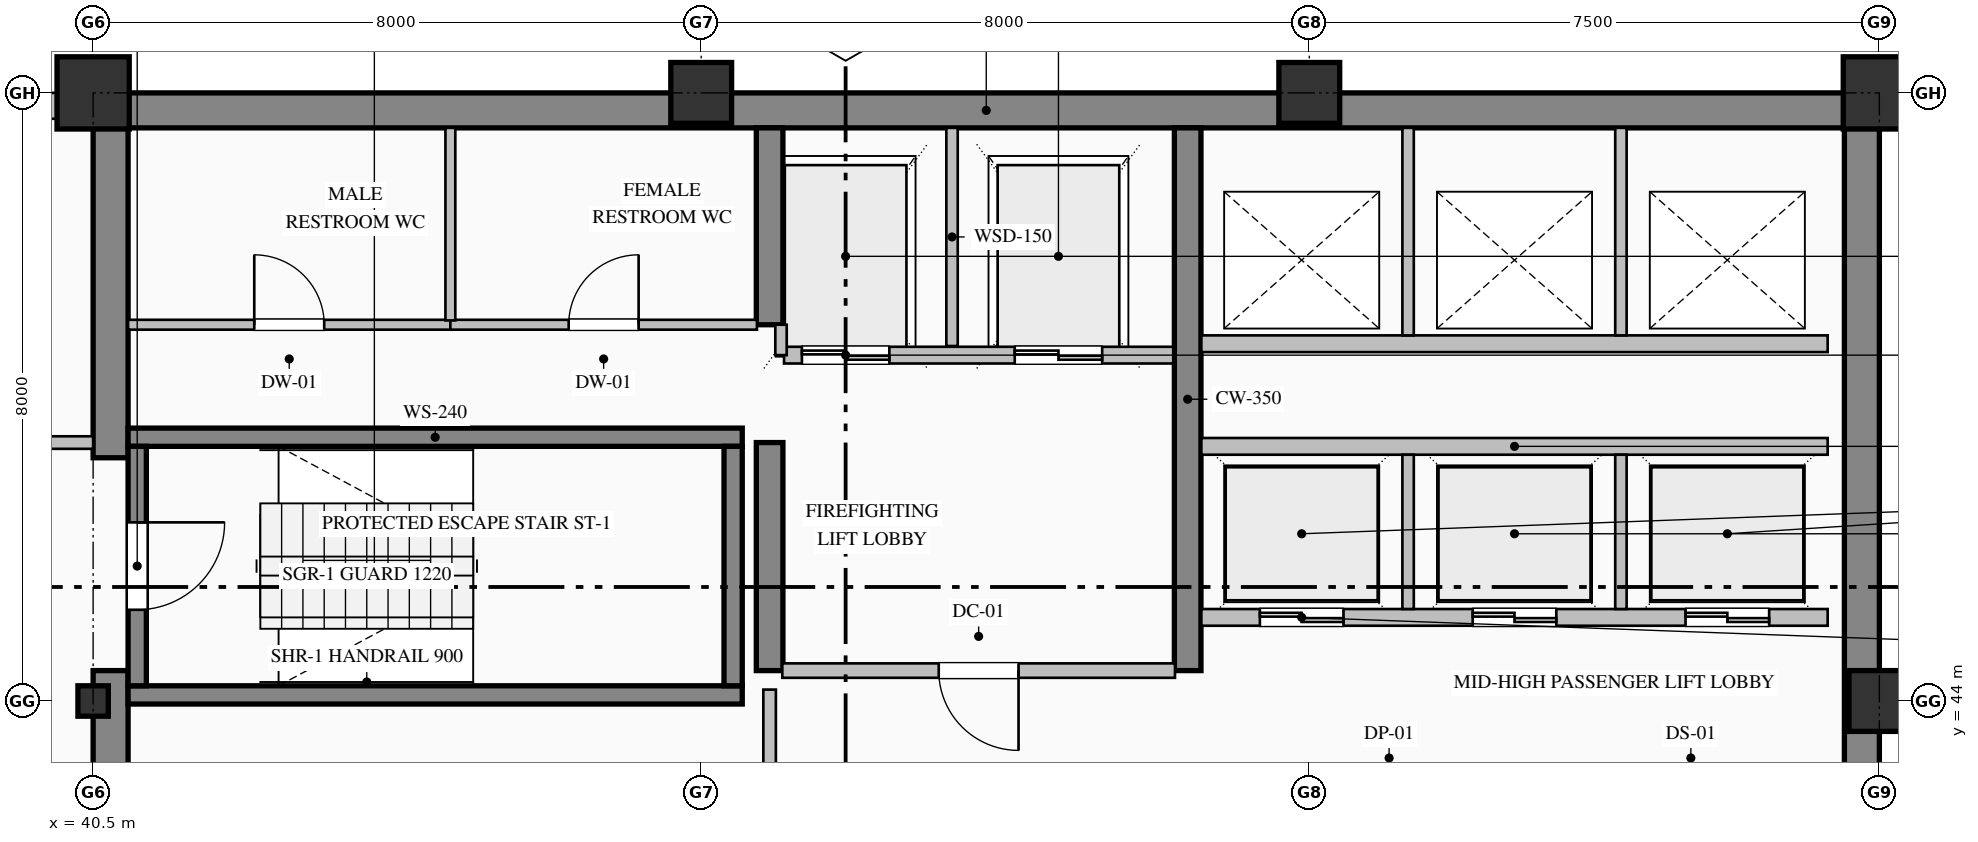
"""IFC4 building model, lengths in metres.
Left out: names, types, materials, properties, quantities, classifications, styles, units other than length and angle.
Written with IfcOpenShell. Run it as: python <this file> out.ifc"""

import sys

from ifc_helpers import new_model, si_unit, direction, frame, frame_2d, origin, origin_2d, place, context, subcontext, project, spatial, rectangle, hollow_rectangle, i_section, extrude, element, fill, save


model = new_model("IFC4")
c1 = context("Model", 3, precision=1e-05, world=origin(), true_north=direction((0.0, 1.0)))
c2 = subcontext(c1, "Body", "Model", "MODEL_VIEW")
j1 = project(units=[si_unit("LENGTHUNIT", "METRE"), si_unit("PLANEANGLEUNIT", "RADIAN")], contexts=[c1])
p1 = place(None, origin())
s1 = spatial("IfcSite", under=j1, at=p1, CompositionType="ELEMENT")
p2 = place(p1, origin())
s2 = spatial("IfcBuilding", under=s1, at=p2, CompositionType="ELEMENT")
p3 = place(p2, frame((0.0, 0.0, 265.8)))
s3 = spatial("IfcBuildingStorey", under=s2, at=p3, CompositionType="ELEMENT", Elevation=265.8)
p4 = place(p3, frame((40.5, 51.77, 0.0), z_axis=(0.0, 0.0, 1.0), x_axis=(1.0, 0.0, 0.0)))
e1 = element("IfcWall", 1, at=p4, inside=s3, PredefinedType="SHEAR", context=c2, shape_type="SweptSolid", body=[
    extrude(rectangle(XDim=23.5, YDim=0.46, at=frame_2d((11.75, 0.0))), origin(), (0.0, 0.0, 1.0), 3.775),
])
p5 = place(p3, frame((63.77, 36.32, 0.0), z_axis=(0.0, 0.0, 1.0), x_axis=(0.0, 1.0, 0.0)))
e2 = element("IfcWall", 2, at=p5, inside=s3, PredefinedType="SHEAR", context=c2, shape_type="SweptSolid", body=[
    extrude(rectangle(XDim=15.22, YDim=0.46, at=frame_2d((7.61, 0.0))), origin(), (0.0, 0.0, 1.0), 3.775),
])
p6 = place(p3, frame((40.73, 36.46, 0.0), z_axis=(0.0, 0.0, 1.0), x_axis=(0.0, 1.0, 0.0)))
e3 = element("IfcWall", 3, at=p6, inside=s3, PredefinedType="SHEAR", context=c2, shape_type="SweptSolid", body=[
    extrude(rectangle(XDim=7.94, YDim=0.46, at=frame_2d((3.97, 0.0))), origin(), (0.0, 0.0, 1.0), 3.775),
])
p7 = place(p3, frame((40.73, 47.2, 0.0), z_axis=(0.0, 0.0, 1.0), x_axis=(0.0, 1.0, 0.0)))
e4 = element("IfcWall", 4, at=p7, inside=s3, PredefinedType="SHEAR", context=c2, shape_type="SweptSolid", body=[
    extrude(rectangle(XDim=4.34, YDim=0.46, at=frame_2d((2.17, 0.0))), origin(), (0.0, 0.0, 1.0), 3.775),
])
p8 = place(p3, frame((49.4, 44.4, 0.0), z_axis=(0.0, 0.0, 1.0), x_axis=(0.0, 1.0, 0.0)))
e5 = element("IfcWall", 5, at=p8, inside=s3, PredefinedType="SHEAR", context=c2, shape_type="SweptSolid", body=[
    extrude(rectangle(XDim=3.0, YDim=0.35, at=frame_2d((1.5, 0.0))), origin(), (0.0, 0.0, 1.0), 3.775),
])
p9 = place(p3, frame((49.4, 48.95, 0.0), z_axis=(0.0, 0.0, 1.0), x_axis=(0.0, 1.0, 0.0)))
e6 = element("IfcWall", 6, at=p9, inside=s3, PredefinedType="SHEAR", context=c2, shape_type="SweptSolid", body=[
    extrude(rectangle(XDim=2.59, YDim=0.35, at=frame_2d((1.295, 0.0))), origin(), (0.0, 0.0, 1.0), 3.775),
])
p10 = place(p3, frame((54.9, 44.4, 0.0), z_axis=(0.0, 0.0, 1.0), x_axis=(0.0, 1.0, 0.0)))
e7 = element("IfcWall", 7, at=p10, inside=s3, PredefinedType="SHEAR", context=c2, shape_type="SweptSolid", body=[
    extrude(rectangle(XDim=7.14, YDim=0.35, at=frame_2d((3.57, 0.0))), origin(), (0.0, 0.0, 1.0), 3.775),
])
p11 = place(p3, frame((40.5, 44.0, 0.0), z_axis=(0.0, 0.0, 1.0), x_axis=(1.0, 0.0, 0.0)))
e8 = element("IfcColumn", 8, at=p11, inside=s3, PredefinedType="COLUMN", context=c2, shape_type="SweptSolid", body=[
    extrude(i_section(OverallWidth=0.4, OverallDepth=0.4, WebThickness=0.013, FlangeThickness=0.021, FilletRadius=0.022, at=origin_2d()), origin(), (0.0, 0.0, 1.0), 4.0),
])
p12 = place(p3, frame((40.5, 52.0, 0.0), z_axis=(0.0, 0.0, 1.0), x_axis=(1.0, 0.0, 0.0)))
e9 = element("IfcColumn", 9, at=p12, inside=s3, PredefinedType="COLUMN", context=c2, shape_type="SweptSolid", body=[
    extrude(hollow_rectangle(XDim=0.95, YDim=0.95, WallThickness=0.036, at=origin_2d()), origin(), (0.0, 0.0, 1.0), 4.0),
])
for number, where, z_axis, x_axis in (
    (10, (48.5, 52.0, 0.0), (0.0, 0.0, 1.0), (1.0, 0.0, 0.0)),
    (11, (56.5, 52.0, 0.0), (0.0, 0.0, 1.0), (1.0, 0.0, 0.0)),
    (12, (64.0, 44.0, 0.0), (0.0, 0.0, 1.0), (1.0, 0.0, 0.0)),
):
    element("IfcColumn", number, at=place(p3, frame(where, z_axis=z_axis, x_axis=x_axis)), inside=s3, PredefinedType="COLUMN", context=c2, shape_type="SweptSolid", body=[
        extrude(hollow_rectangle(XDim=0.8, YDim=0.8, WallThickness=0.032, at=origin_2d()), origin(), (0.0, 0.0, 1.0), 4.0),
    ])
p13 = place(p3, frame((64.0, 52.0, 0.0), z_axis=(0.0, 0.0, 1.0), x_axis=(1.0, 0.0, 0.0)))
e13 = element("IfcColumn", 13, at=p13, inside=s3, PredefinedType="COLUMN", context=c2, shape_type="SweptSolid", body=[
    extrude(hollow_rectangle(XDim=0.95, YDim=0.95, WallThickness=0.036, at=origin_2d()), origin(), (0.0, 0.0, 1.0), 4.0),
])
p14 = place(p3, frame((13.0, 51.83, 0.0), z_axis=(0.0, 0.0, 1.0), x_axis=(1.0, 0.0, 0.0)))
e14 = element("IfcWall", 14, at=p14, inside=s3, PredefinedType="SOLIDWALL", context=c2, shape_type="SweptSolid", body=[
    extrude(rectangle(XDim=27.52, YDim=0.34, at=frame_2d((13.76, 0.0))), origin(), (0.0, 0.0, 1.0), 3.325),
])
p15 = place(p14, frame((6.525, 0.0, 0.9)))
e15 = element("IfcOpeningElement", 15, at=p15, cuts=e14, PredefinedType="OPENING", context=c2, shape_type="SweptSolid", body=[
    extrude(rectangle(XDim=1.35, YDim=1.85, at=frame_2d((0.675, 0.925))), frame((0.0, 0.18, 0.0), z_axis=(0.0, -1.0, 0.0), x_axis=(1.0, 0.0, 0.0)), (0.0, 0.0, 1.0), 0.36),
])
p16 = place(p14, frame((17.325, 0.0, 0.9)))
e16 = element("IfcOpeningElement", 16, at=p16, cuts=e14, PredefinedType="OPENING", context=c2, shape_type="SweptSolid", body=[
    extrude(rectangle(XDim=1.35, YDim=1.85, at=frame_2d((0.675, 0.925))), frame((0.0, 0.18, 0.0), z_axis=(0.0, -1.0, 0.0), x_axis=(1.0, 0.0, 0.0)), (0.0, 0.0, 1.0), 0.36),
])
for number, where, z_axis, x_axis in (
    (17, (40.96, 47.47, 0.0), (0.0, 0.0, 1.0), (1.0, 0.0, 0.0)),
    (18, (49.04, 44.08, 0.0), (0.0, 0.0, 1.0), (-1.0, 0.0, 0.0)),
):
    element("IfcWall", number, at=place(p3, frame(where, z_axis=z_axis, x_axis=x_axis)), inside=s3, PredefinedType="SOLIDWALL", context=c2, shape_type="SweptSolid", body=[
        extrude(rectangle(XDim=8.08, YDim=0.24, at=frame_2d((4.04, 0.0))), origin(), (0.0, 0.0, 1.0), 4.0),
    ])
p17 = place(p3, frame((41.08, 47.35, 0.0), z_axis=(0.0, 0.0, 1.0), x_axis=(0.0, -1.0, 0.0)))
e19 = element("IfcWall", 19, at=p17, inside=s3, PredefinedType="SOLIDWALL", context=c2, shape_type="SweptSolid", body=[
    extrude(rectangle(XDim=3.15, YDim=0.24, at=frame_2d((1.575, 0.0))), origin(), (0.0, 0.0, 1.0), 4.0),
])
p18 = place(p17, frame((1.0, 0.0, 0.0)))
e20 = element("IfcOpeningElement", 20, at=p18, cuts=e19, PredefinedType="OPENING", context=c2, shape_type="SweptSolid", body=[
    extrude(rectangle(XDim=1.15, YDim=2.2, at=frame_2d((0.575, 1.1))), frame((0.0, 0.13, 0.0), z_axis=(0.0, -1.0, 0.0), x_axis=(1.0, 0.0, 0.0)), (0.0, 0.0, 1.0), 0.26),
])
p19 = place(p3, frame((48.92, 44.2, 0.0), z_axis=(0.0, 0.0, 1.0), x_axis=(0.0, 1.0, 0.0)))
e21 = element("IfcWall", 21, at=p19, inside=s3, PredefinedType="SOLIDWALL", context=c2, shape_type="SweptSolid", body=[
    extrude(rectangle(XDim=3.15, YDim=0.24, at=frame_2d((1.575, 0.0))), origin(), (0.0, 0.0, 1.0), 4.0),
])
p20 = place(p3, frame((54.71, 48.55, 0.0), z_axis=(0.0, 0.0, 1.0), x_axis=(-1.0, 0.0, 0.0)))
e22 = element("IfcWall", 22, at=p20, inside=s3, PredefinedType="PARTITIONING", context=c2, shape_type="SweptSolid", body=[
    extrude(rectangle(XDim=5.12, YDim=0.22, at=frame_2d((2.56, 0.0))), origin(), (0.0, 0.0, 1.0), 3.775),
])
p21 = place(p20, frame((3.735, 0.0, 0.0)))
e23 = element("IfcOpeningElement", 23, at=p21, cuts=e22, PredefinedType="OPENING", context=c2, shape_type="SweptSolid", body=[
    extrude(rectangle(XDim=1.15, YDim=2.2, at=frame_2d((0.575, 1.1))), frame((0.0, 0.12, 0.0), z_axis=(0.0, -1.0, 0.0), x_axis=(1.0, 0.0, 0.0)), (0.0, 0.0, 1.0), 0.24),
])
p22 = place(p20, frame((0.935, 0.0, 0.0)))
e24 = element("IfcOpeningElement", 24, at=p22, cuts=e22, PredefinedType="OPENING", context=c2, shape_type="SweptSolid", body=[
    extrude(rectangle(XDim=1.15, YDim=2.2, at=frame_2d((0.575, 1.1))), frame((0.0, 0.12, 0.0), z_axis=(0.0, -1.0, 0.0), x_axis=(1.0, 0.0, 0.0)), (0.0, 0.0, 1.0), 0.24),
])
p23 = place(p3, frame((51.8, 48.67, 0.0), z_axis=(0.0, 0.0, 1.0), x_axis=(0.0, 1.0, 0.0)))
e25 = element("IfcWall", 25, at=p23, inside=s3, PredefinedType="PARTITIONING", context=c2, shape_type="SweptSolid", body=[
    extrude(rectangle(XDim=2.87, YDim=0.15, at=frame_2d((1.435, 0.0))), origin(), (0.0, 0.0, 1.0), 3.775),
])
p24 = place(p3, frame((49.55, 48.55, 0.0), z_axis=(0.0, 0.0, 1.0), x_axis=(0.0, 1.0, 0.0)))
e26 = element("IfcWall", 26, at=p24, inside=s3, PredefinedType="PARTITIONING", context=c2, shape_type="SweptSolid", body=[
    extrude(rectangle(XDim=0.4, YDim=0.15, at=frame_2d((0.2, 0.0))), origin(), (0.0, 0.0, 1.0), 3.775),
])
p25 = place(p3, frame((63.32, 45.1, 0.0), z_axis=(0.0, 0.0, 1.0), x_axis=(-1.0, 0.0, 0.0)))
e27 = element("IfcWall", 27, at=p25, inside=s3, PredefinedType="PARTITIONING", context=c2, shape_type="SweptSolid", body=[
    extrude(rectangle(XDim=8.24, YDim=0.22, at=frame_2d((4.12, 0.0))), origin(), (0.0, 0.0, 1.0), 3.775),
])
p26 = place(p25, frame((6.37, 0.0, 0.0)))
e28 = element("IfcOpeningElement", 28, at=p26, cuts=e27, PredefinedType="OPENING", context=c2, shape_type="SweptSolid", body=[
    extrude(rectangle(XDim=1.1, YDim=2.2, at=frame_2d((0.55, 1.1))), frame((0.0, 0.12, 0.0), z_axis=(0.0, -1.0, 0.0), x_axis=(1.0, 0.0, 0.0)), (0.0, 0.0, 1.0), 0.24),
])
p27 = place(p25, frame((3.57, 0.0, 0.0)))
e29 = element("IfcOpeningElement", 29, at=p27, cuts=e27, PredefinedType="OPENING", context=c2, shape_type="SweptSolid", body=[
    extrude(rectangle(XDim=1.1, YDim=2.2, at=frame_2d((0.55, 1.1))), frame((0.0, 0.12, 0.0), z_axis=(0.0, -1.0, 0.0), x_axis=(1.0, 0.0, 0.0)), (0.0, 0.0, 1.0), 0.24),
])
p28 = place(p25, frame((0.77, 0.0, 0.0)))
e30 = element("IfcOpeningElement", 30, at=p28, cuts=e27, PredefinedType="OPENING", context=c2, shape_type="SweptSolid", body=[
    extrude(rectangle(XDim=1.1, YDim=2.2, at=frame_2d((0.55, 1.1))), frame((0.0, 0.12, 0.0), z_axis=(0.0, -1.0, 0.0), x_axis=(1.0, 0.0, 0.0)), (0.0, 0.0, 1.0), 0.24),
])
p29 = place(p3, frame((55.08, 47.35, 0.0), z_axis=(0.0, 0.0, 1.0), x_axis=(1.0, 0.0, 0.0)))
e31 = element("IfcWall", 31, at=p29, inside=s3, PredefinedType="PARTITIONING", context=c2, shape_type="SweptSolid", body=[
    extrude(rectangle(XDim=8.24, YDim=0.22, at=frame_2d((4.12, 0.0))), origin(), (0.0, 0.0, 1.0), 3.775),
])
for number, where, z_axis, x_axis in (
    (32, (57.8, 45.21, 0.0), (0.0, 0.0, 1.0), (0.0, 1.0, 0.0)),
    (33, (60.6, 45.21, 0.0), (0.0, 0.0, 1.0), (0.0, 1.0, 0.0)),
):
    element("IfcWall", number, at=place(p3, frame(where, z_axis=z_axis, x_axis=x_axis)), inside=s3, PredefinedType="PARTITIONING", context=c2, shape_type="SweptSolid", body=[
        extrude(rectangle(XDim=2.03, YDim=0.15, at=frame_2d((1.015, 0.0))), origin(), (0.0, 0.0, 1.0), 3.775),
    ])
p30 = place(p3, frame((63.32, 48.7, 0.0), z_axis=(0.0, 0.0, 1.0), x_axis=(-1.0, 0.0, 0.0)))
e34 = element("IfcWall", 34, at=p30, inside=s3, PredefinedType="PARTITIONING", context=c2, shape_type="SweptSolid", body=[
    extrude(rectangle(XDim=8.24, YDim=0.22, at=frame_2d((4.12, 0.0))), origin(), (0.0, 0.0, 1.0), 3.775),
])
for number, where, z_axis, x_axis in (
    (35, (57.8, 48.81, 0.0), (0.0, 0.0, 1.0), (0.0, 1.0, 0.0)),
    (36, (60.6, 48.81, 0.0), (0.0, 0.0, 1.0), (0.0, 1.0, 0.0)),
):
    element("IfcWall", number, at=place(p3, frame(where, z_axis=z_axis, x_axis=x_axis)), inside=s3, PredefinedType="PARTITIONING", context=c2, shape_type="SweptSolid", body=[
        extrude(rectangle(XDim=2.73, YDim=0.15, at=frame_2d((1.365, 0.0))), origin(), (0.0, 0.0, 1.0), 3.775),
    ])
p31 = place(p3, frame((37.8, 47.4, 0.0), z_axis=(0.0, 0.0, 1.0), x_axis=(1.0, 0.0, 0.0)))
e37 = element("IfcWall", 37, at=p31, inside=s3, PredefinedType="PARTITIONING", context=c2, shape_type="SweptSolid", body=[
    extrude(rectangle(XDim=2.7, YDim=0.165, at=frame_2d((1.35, 0.0))), origin(), (0.0, 0.0, 1.0), 3.775),
])
p32 = place(p31, frame((0.825, 0.0, 0.0)))
e38 = element("IfcOpeningElement", 38, at=p32, cuts=e37, PredefinedType="OPENING", context=c2, shape_type="SweptSolid", body=[
    extrude(rectangle(XDim=1.05, YDim=2.15, at=frame_2d((0.525, 1.075))), frame((0.0, 0.093, 0.0), z_axis=(0.0, -1.0, 0.0), x_axis=(1.0, 0.0, 0.0)), (0.0, 0.0, 1.0), 0.185),
])
p33 = place(p3, frame((40.96, 48.95, 0.0), z_axis=(0.0, 0.0, 1.0), x_axis=(1.0, 0.0, 0.0)))
e39 = element("IfcWall", 39, at=p33, inside=s3, PredefinedType="PARTITIONING", context=c2, shape_type="SweptSolid", body=[
    extrude(rectangle(XDim=4.24, YDim=0.13, at=frame_2d((2.12, 0.0))), origin(), (0.0, 0.0, 1.0), 3.775),
])
p34 = place(p33, frame((1.66, 0.0, 0.0)))
e40 = element("IfcOpeningElement", 40, at=p34, cuts=e39, PredefinedType="OPENING", context=c2, shape_type="SweptSolid", body=[
    extrude(rectangle(XDim=0.92, YDim=2.15, at=frame_2d((0.46, 1.075))), frame((0.0, 0.075, 0.0), z_axis=(0.0, -1.0, 0.0), x_axis=(1.0, 0.0, 0.0)), (0.0, 0.0, 1.0), 0.15),
])
p35 = place(p3, frame((45.2, 48.95, 0.0), z_axis=(0.0, 0.0, 1.0), x_axis=(1.0, 0.0, 0.0)))
e41 = element("IfcWall", 41, at=p35, inside=s3, PredefinedType="PARTITIONING", context=c2, shape_type="SweptSolid", body=[
    extrude(rectangle(XDim=4.033, YDim=0.13, at=frame_2d((2.017, 0.0))), origin(), (0.0, 0.0, 1.0), 3.775),
])
p36 = place(p35, frame((1.556, 0.0, 0.0)))
e42 = element("IfcOpeningElement", 42, at=p36, cuts=e41, PredefinedType="OPENING", context=c2, shape_type="SweptSolid", body=[
    extrude(rectangle(XDim=0.92, YDim=2.15, at=frame_2d((0.46, 1.075))), frame((0.0, 0.075, 0.0), z_axis=(0.0, -1.0, 0.0), x_axis=(1.0, 0.0, 0.0)), (0.0, 0.0, 1.0), 0.15),
])
p37 = place(p3, frame((54.733, 44.4, 0.0), z_axis=(0.0, 0.0, 1.0), x_axis=(-1.0, 0.0, 0.0)))
e43 = element("IfcWall", 43, at=p37, inside=s3, PredefinedType="PARTITIONING", context=c2, shape_type="SweptSolid", body=[
    extrude(rectangle(XDim=5.166, YDim=0.19, at=frame_2d((2.583, 0.0))), origin(), (0.0, 0.0, 1.0), 3.775),
])
p38 = place(p37, frame((2.058, 0.0, 0.0)))
e44 = element("IfcOpeningElement", 44, at=p38, cuts=e43, PredefinedType="OPENING", context=c2, shape_type="SweptSolid", body=[
    extrude(rectangle(XDim=1.05, YDim=2.15, at=frame_2d((0.525, 1.075))), frame((0.0, 0.105, 0.0), z_axis=(0.0, -1.0, 0.0), x_axis=(1.0, 0.0, 0.0)), (0.0, 0.0, 1.0), 0.21),
])
p39 = place(p3, frame((49.4, 36.46, 0.0), z_axis=(0.0, 0.0, 1.0), x_axis=(0.0, 1.0, 0.0)))
e45 = element("IfcWall", 45, at=p39, inside=s3, PredefinedType="PARTITIONING", context=c2, shape_type="SweptSolid", body=[
    extrude(rectangle(XDim=7.69, YDim=0.165, at=frame_2d((3.845, 0.0))), origin(), (0.0, 0.0, 1.0), 3.017),
])
p40 = place(p39, frame((3.345, 0.0, 0.0)))
e46 = element("IfcOpeningElement", 46, at=p40, cuts=e45, PredefinedType="OPENING", context=c2, shape_type="SweptSolid", body=[
    extrude(rectangle(XDim=1.0, YDim=2.15, at=frame_2d((0.5, 1.075))), frame((0.0, 0.093, 0.0), z_axis=(0.0, -1.0, 0.0), x_axis=(1.0, 0.0, 0.0)), (0.0, 0.0, 1.0), 0.185),
])
p41 = place(p3, frame((45.2, 51.54, 0.0), z_axis=(0.0, 0.0, 1.0), x_axis=(0.0, -1.0, 0.0)))
e47 = element("IfcWall", 47, at=p41, inside=s3, PredefinedType="PARTITIONING", context=c2, shape_type="SweptSolid", body=[
    extrude(rectangle(XDim=2.533, YDim=0.13, at=frame_2d((1.267, 0.0))), origin(), (0.0, 0.0, 1.0), 3.775),
])
p42 = place(p18, origin())
e48 = element("IfcDoor", 48, at=p42, inside=s3, OperationType="SINGLE_SWING_LEFT", PredefinedType="DOOR", context=c2, shape_type="SweptSolid", body=[
    extrude(rectangle(XDim=1.15, YDim=2.2, at=frame_2d((0.575, 1.1))), frame((0.0, 0.025, 0.0), z_axis=(0.0, -1.0, 0.0), x_axis=(1.0, 0.0, 0.0)), (0.0, 0.0, 1.0), 0.05),
])
fill(e20, e48)
p43 = place(p21, origin())
e49 = element("IfcDoor", 49, at=p43, inside=s3, OperationType="DOUBLE_DOOR_SLIDING", PredefinedType="DOOR", context=c2, shape_type="SweptSolid", body=[
    extrude(rectangle(XDim=1.15, YDim=2.2, at=frame_2d((0.575, 1.1))), frame((0.0, 0.025, 0.0), z_axis=(0.0, -1.0, 0.0), x_axis=(1.0, 0.0, 0.0)), (0.0, 0.0, 1.0), 0.05),
])
fill(e23, e49)
p44 = place(p22, origin())
e50 = element("IfcDoor", 50, at=p44, inside=s3, OperationType="DOUBLE_DOOR_SLIDING", PredefinedType="DOOR", context=c2, shape_type="SweptSolid", body=[
    extrude(rectangle(XDim=1.15, YDim=2.2, at=frame_2d((0.575, 1.1))), frame((0.0, 0.025, 0.0), z_axis=(0.0, -1.0, 0.0), x_axis=(1.0, 0.0, 0.0)), (0.0, 0.0, 1.0), 0.05),
])
fill(e24, e50)
p45 = place(p26, origin())
e51 = element("IfcDoor", 51, at=p45, inside=s3, OperationType="DOUBLE_DOOR_SLIDING", PredefinedType="DOOR", context=c2, shape_type="SweptSolid", body=[
    extrude(rectangle(XDim=1.1, YDim=2.2, at=frame_2d((0.55, 1.1))), frame((0.0, 0.025, 0.0), z_axis=(0.0, -1.0, 0.0), x_axis=(1.0, 0.0, 0.0)), (0.0, 0.0, 1.0), 0.05),
])
fill(e28, e51)
p46 = place(p27, origin())
e52 = element("IfcDoor", 52, at=p46, inside=s3, OperationType="DOUBLE_DOOR_SLIDING", PredefinedType="DOOR", context=c2, shape_type="SweptSolid", body=[
    extrude(rectangle(XDim=1.1, YDim=2.2, at=frame_2d((0.55, 1.1))), frame((0.0, 0.025, 0.0), z_axis=(0.0, -1.0, 0.0), x_axis=(1.0, 0.0, 0.0)), (0.0, 0.0, 1.0), 0.05),
])
fill(e29, e52)
p47 = place(p28, origin())
e53 = element("IfcDoor", 53, at=p47, inside=s3, OperationType="DOUBLE_DOOR_SLIDING", PredefinedType="DOOR", context=c2, shape_type="SweptSolid", body=[
    extrude(rectangle(XDim=1.1, YDim=2.2, at=frame_2d((0.55, 1.1))), frame((0.0, 0.025, 0.0), z_axis=(0.0, -1.0, 0.0), x_axis=(1.0, 0.0, 0.0)), (0.0, 0.0, 1.0), 0.05),
])
fill(e30, e53)
p48 = place(p38, origin())
e54 = element("IfcDoor", 54, at=p48, inside=s3, OperationType="SINGLE_SWING_LEFT", PredefinedType="DOOR", context=c2, shape_type="SweptSolid", body=[
    extrude(rectangle(XDim=1.05, YDim=2.15, at=frame_2d((0.525, 1.075))), frame((0.0, 0.025, 0.0), z_axis=(0.0, -1.0, 0.0), x_axis=(1.0, 0.0, 0.0)), (0.0, 0.0, 1.0), 0.05),
])
fill(e44, e54)
p49 = place(p34, origin())
e55 = element("IfcDoor", 55, at=p49, inside=s3, OperationType="SINGLE_SWING_LEFT", PredefinedType="DOOR", context=c2, shape_type="SweptSolid", body=[
    extrude(rectangle(XDim=0.92, YDim=2.15, at=frame_2d((0.46, 1.075))), frame((0.0, 0.025, 0.0), z_axis=(0.0, -1.0, 0.0), x_axis=(1.0, 0.0, 0.0)), (0.0, 0.0, 1.0), 0.05),
])
fill(e40, e55)
p50 = place(p36, origin())
e56 = element("IfcDoor", 56, at=p50, inside=s3, OperationType="SINGLE_SWING_RIGHT", PredefinedType="DOOR", context=c2, shape_type="SweptSolid", body=[
    extrude(rectangle(XDim=0.92, YDim=2.15, at=frame_2d((0.46, 1.075))), frame((0.0, 0.025, 0.0), z_axis=(0.0, -1.0, 0.0), x_axis=(1.0, 0.0, 0.0)), (0.0, 0.0, 1.0), 0.05),
])
fill(e42, e56)
save(model, sys.argv[1])
